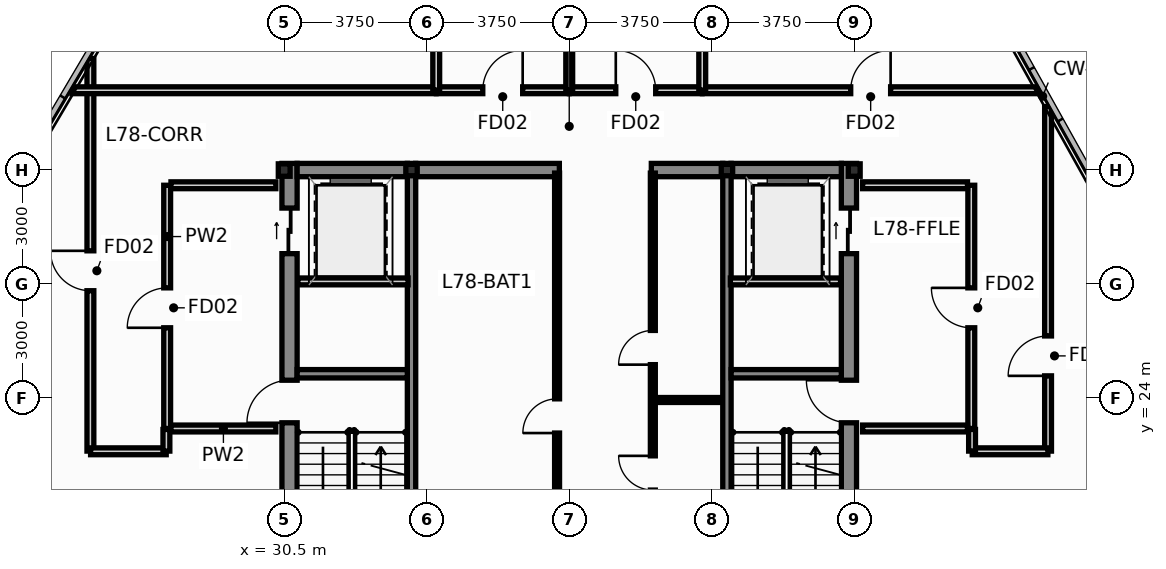
"""IFC4 building model, lengths in metres.
Left out: names, types, materials, properties, quantities, classifications, styles, units other than length and angle.
Written with IfcOpenShell. Run it as: python <this file> out.ifc"""

import sys

from ifc_helpers import new_model, si_unit, direction, frame, frame_2d, origin, origin_2d, place, context, subcontext, project, spatial, rectangle, hollow_rectangle, i_section, extrude, source, transform, mapped, element, fill, save


model = new_model("IFC4")
c1 = context("Model", 3, precision=1e-05, world=origin(), true_north=direction((0.0, 1.0)))
c2 = subcontext(c1, "Body", "Model", "MODEL_VIEW")
j1 = project(units=[si_unit("LENGTHUNIT", "METRE"), si_unit("PLANEANGLEUNIT", "RADIAN")], contexts=[c1])
p1 = place(None, origin())
s1 = spatial("IfcSite", under=j1, at=p1, CompositionType="ELEMENT")
p2 = place(p1, origin())
s2 = spatial("IfcBuilding", under=s1, at=p2, CompositionType="ELEMENT")
p3 = place(p2, frame((0.0, 0.0, 296.6)))
s3 = spatial("IfcBuildingStorey", under=s2, at=p3, CompositionType="ELEMENT", Elevation=296.6)
m1 = source(origin(), c2, "Body", "SweptSolid", [
    extrude(i_section(OverallWidth=0.311, OverallDepth=0.327, WebThickness=0.016, FlangeThickness=0.025, at=origin_2d()), origin(), (0.0, 0.0, 1.0), 3.4),
])
for number, where, z_axis, x_axis in (
    (1, (45.5, 30.0, 0.0), (0.0, 0.0, 1.0), (1.0, 0.0, 0.0)),
    (2, (30.5, 30.0, 0.0), (0.0, 0.0, 1.0), (1.0, 0.0, 0.0)),
):
    element("IfcColumn", number, at=place(p3, frame(where, z_axis=z_axis, x_axis=x_axis)), inside=s3, PredefinedType="COLUMN", context=c2, shape_type="MappedRepresentation", body=[
        mapped(m1, transform((0.0, 0.0, 0.0), scale=1.0)),
    ])
m2 = source(origin(), c2, "Body", "SweptSolid", [
    extrude(hollow_rectangle(XDim=0.3, YDim=0.3, WallThickness=0.012, at=origin_2d()), origin(), (0.0, 0.0, 1.0), 3.4),
])
for number, where, z_axis, x_axis in (
    (3, (33.85, 30.0, 0.0), (0.0, 0.0, 1.0), (1.0, 0.0, 0.0)),
    (4, (42.15, 30.0, 0.0), (0.0, 0.0, 1.0), (1.0, 0.0, 0.0)),
):
    element("IfcColumn", number, at=place(p3, frame(where, z_axis=z_axis, x_axis=x_axis)), inside=s3, PredefinedType="COLUMN", context=c2, shape_type="MappedRepresentation", body=[
        mapped(m2, transform((0.0, 0.0, 0.0), scale=1.0)),
    ])
p4 = place(p3, frame((30.64, 17.05, 0.0), z_axis=(0.0, 0.0, 1.0), x_axis=(0.0, 1.0, 0.0)))
e5 = element("IfcWall", 5, at=p4, inside=s3, PredefinedType="SHEAR", context=c2, shape_type="SweptSolid", body=[
    extrude(rectangle(XDim=13.125, YDim=0.4, at=frame_2d((6.562, 0.0))), origin(), (0.0, 0.0, 1.0), 3.4),
])
p5 = place(p4, frame((6.3, 0.0, 0.0)))
e6 = element("IfcOpeningElement", 6, at=p5, cuts=e5, PredefinedType="OPENING", context=c2, shape_type="SweptSolid", body=[
    extrude(rectangle(XDim=1.12, YDim=2.15, at=frame_2d((0.56, 1.075))), frame((0.0, 0.212, 0.0), z_axis=(0.0, -1.0, 0.0), x_axis=(1.0, 0.0, 0.0)), (0.0, 0.0, 1.0), 0.424),
])
p6 = place(p4, frame((10.75, 0.0, 0.0)))
e7 = element("IfcOpeningElement", 7, at=p6, cuts=e5, PredefinedType="OPENING", context=c2, shape_type="SweptSolid", body=[
    extrude(rectangle(XDim=1.2, YDim=2.2, at=frame_2d((0.6, 1.1))), frame((0.0, 0.212, 0.0), z_axis=(0.0, -1.0, 0.0), x_axis=(1.0, 0.0, 0.0)), (0.0, 0.0, 1.0), 0.424),
])
p7 = place(p3, frame((45.36, 17.05, 0.0), z_axis=(0.0, 0.0, 1.0), x_axis=(0.0, 1.0, 0.0)))
e8 = element("IfcWall", 8, at=p7, inside=s3, PredefinedType="SHEAR", context=c2, shape_type="SweptSolid", body=[
    extrude(rectangle(XDim=13.125, YDim=0.4, at=frame_2d((6.562, 0.0))), origin(), (0.0, 0.0, 1.0), 3.4),
])
p8 = place(p7, frame((6.3, 0.0, 0.0)))
e9 = element("IfcOpeningElement", 9, at=p8, cuts=e8, PredefinedType="OPENING", context=c2, shape_type="SweptSolid", body=[
    extrude(rectangle(XDim=1.12, YDim=2.15, at=frame_2d((0.56, 1.075))), frame((0.0, 0.212, 0.0), z_axis=(0.0, -1.0, 0.0), x_axis=(1.0, 0.0, 0.0)), (0.0, 0.0, 1.0), 0.424),
])
p9 = place(p7, frame((10.75, 0.0, 0.0)))
e10 = element("IfcOpeningElement", 10, at=p9, cuts=e8, PredefinedType="OPENING", context=c2, shape_type="SweptSolid", body=[
    extrude(rectangle(XDim=1.2, YDim=2.2, at=frame_2d((0.6, 1.1))), frame((0.0, 0.212, 0.0), z_axis=(0.0, -1.0, 0.0), x_axis=(1.0, 0.0, 0.0)), (0.0, 0.0, 1.0), 0.424),
])
p10 = place(p3, frame((30.84, 30.0, 0.0), z_axis=(0.0, 0.0, 1.0), x_axis=(1.0, 0.0, 0.0)))
e11 = element("IfcWall", 11, at=p10, inside=s3, PredefinedType="SHEAR", context=c2, shape_type="SweptSolid", body=[
    extrude(rectangle(XDim=2.9, YDim=0.35, at=frame_2d((1.45, 0.0))), origin(), (0.0, 0.0, 1.0), 3.4),
])
p11 = place(p3, frame((33.96, 30.0, 0.0), z_axis=(0.0, 0.0, 1.0), x_axis=(1.0, 0.0, 0.0)))
e12 = element("IfcWall", 12, at=p11, inside=s3, PredefinedType="SHEAR", context=c2, shape_type="SweptSolid", body=[
    extrude(rectangle(XDim=3.78, YDim=0.35, at=frame_2d((1.89, 0.0))), origin(), (0.0, 0.0, 1.0), 3.4),
])
p12 = place(p3, frame((40.16, 30.0, 0.0), z_axis=(0.0, 0.0, 1.0), x_axis=(1.0, 0.0, 0.0)))
e13 = element("IfcWall", 13, at=p12, inside=s3, PredefinedType="SHEAR", context=c2, shape_type="SweptSolid", body=[
    extrude(rectangle(XDim=1.88, YDim=0.35, at=frame_2d((0.94, 0.0))), origin(), (0.0, 0.0, 1.0), 3.4),
])
p13 = place(p3, frame((42.26, 30.0, 0.0), z_axis=(0.0, 0.0, 1.0), x_axis=(1.0, 0.0, 0.0)))
e14 = element("IfcWall", 14, at=p13, inside=s3, PredefinedType="SHEAR", context=c2, shape_type="SweptSolid", body=[
    extrude(rectangle(XDim=2.9, YDim=0.35, at=frame_2d((1.45, 0.0))), origin(), (0.0, 0.0, 1.0), 3.4),
])
for number, where, z_axis, x_axis in (
    (15, (33.85, 17.05, 0.0), (0.0, 0.0, 1.0), (0.0, 1.0, 0.0)),
    (16, (42.15, 17.05, 0.0), (0.0, 0.0, 1.0), (0.0, 1.0, 0.0)),
):
    element("IfcWall", number, at=place(p3, frame(where, z_axis=z_axis, x_axis=x_axis)), inside=s3, PredefinedType="SHEAR", context=c2, shape_type="SweptSolid", body=[
        extrude(rectangle(XDim=13.125, YDim=0.22, at=frame_2d((6.562, 0.0))), origin(), (0.0, 0.0, 1.0), 3.4),
    ])
for number, where, z_axis, x_axis in (
    (17, (30.84, 24.64, 0.0), (0.0, 0.0, 1.0), (1.0, 0.0, 0.0)),
    (18, (42.26, 24.64, 0.0), (0.0, 0.0, 1.0), (1.0, 0.0, 0.0)),
):
    element("IfcWall", number, at=place(p3, frame(where, z_axis=z_axis, x_axis=x_axis)), inside=s3, PredefinedType="SHEAR", context=c2, shape_type="SweptSolid", body=[
        extrude(rectangle(XDim=2.9, YDim=0.22, at=frame_2d((1.45, 0.0))), origin(), (0.0, 0.0, 1.0), 3.4),
    ])
p14 = place(p3, frame((27.42, 23.2, 0.0), z_axis=(0.0, 0.0, 1.0), x_axis=(0.0, 1.0, 0.0)))
e19 = element("IfcWall", 19, at=p14, inside=s3, PredefinedType="PARTITIONING", context=c2, shape_type="SweptSolid", body=[
    extrude(rectangle(XDim=6.4, YDim=0.18, at=frame_2d((3.2, 0.0))), origin(), (0.0, 0.0, 1.0), 2.879),
])
p15 = place(p14, frame((2.65, 0.0, 0.0)))
e20 = element("IfcOpeningElement", 20, at=p15, cuts=e19, PredefinedType="OPENING", context=c2, shape_type="SweptSolid", body=[
    extrude(rectangle(XDim=1.05, YDim=2.15, at=frame_2d((0.525, 1.075))), frame((0.0, 0.102, 0.0), z_axis=(0.0, -1.0, 0.0), x_axis=(1.0, 0.0, 0.0)), (0.0, 0.0, 1.0), 0.204),
])
for number, where, z_axis, x_axis in (
    (21, (27.52, 23.2, 0.0), (0.0, 0.0, 1.0), (1.0, 0.0, 0.0)),
    (22, (27.52, 29.6, 0.0), (0.0, 0.0, 1.0), (1.0, 0.0, 0.0)),
):
    element("IfcWall", number, at=place(p3, frame(where, z_axis=z_axis, x_axis=x_axis)), inside=s3, PredefinedType="PARTITIONING", context=c2, shape_type="SweptSolid", body=[
        extrude(rectangle(XDim=2.76, YDim=0.18, at=frame_2d((1.38, 0.0))), origin(), (0.0, 0.0, 1.0), 3.15),
    ])
p16 = place(p3, frame((48.58, 23.2, 0.0), z_axis=(0.0, 0.0, 1.0), x_axis=(0.0, 1.0, 0.0)))
e23 = element("IfcWall", 23, at=p16, inside=s3, PredefinedType="PARTITIONING", context=c2, shape_type="SweptSolid", body=[
    extrude(rectangle(XDim=6.4, YDim=0.18, at=frame_2d((3.2, 0.0))), origin(), (0.0, 0.0, 1.0), 2.879),
])
p17 = place(p16, frame((2.65, 0.0, 0.0)))
e24 = element("IfcOpeningElement", 24, at=p17, cuts=e23, PredefinedType="OPENING", context=c2, shape_type="SweptSolid", body=[
    extrude(rectangle(XDim=1.05, YDim=2.15, at=frame_2d((0.525, 1.075))), frame((0.0, 0.102, 0.0), z_axis=(0.0, -1.0, 0.0), x_axis=(1.0, 0.0, 0.0)), (0.0, 0.0, 1.0), 0.204),
])
for number, where, z_axis, x_axis in (
    (25, (45.72, 23.2, 0.0), (0.0, 0.0, 1.0), (1.0, 0.0, 0.0)),
    (26, (45.72, 29.6, 0.0), (0.0, 0.0, 1.0), (1.0, 0.0, 0.0)),
):
    element("IfcWall", number, at=place(p3, frame(where, z_axis=z_axis, x_axis=x_axis)), inside=s3, PredefinedType="PARTITIONING", context=c2, shape_type="SweptSolid", body=[
        extrude(rectangle(XDim=2.76, YDim=0.18, at=frame_2d((1.38, 0.0))), origin(), (0.0, 0.0, 1.0), 3.15),
    ])
for number, where, z_axis, x_axis in (
    (27, (30.86, 27.07, 0.0), (0.0, 0.0, 1.0), (1.0, 0.0, 0.0)),
    (28, (42.24, 27.07, 0.0), (0.0, 0.0, 1.0), (1.0, 0.0, 0.0)),
):
    element("IfcWall", number, at=place(p3, frame(where, z_axis=z_axis, x_axis=x_axis)), inside=s3, PredefinedType="PARTITIONING", context=c2, shape_type="SweptSolid", body=[
        extrude(rectangle(XDim=2.9, YDim=0.18, at=frame_2d((1.45, 0.0))), origin(), (0.0, 0.0, 1.0), 3.15),
    ])
p18 = place(p3, frame((40.28, 23.95, 0.0), z_axis=(0.0, 0.0, 1.0), x_axis=(1.0, 0.0, 0.0)))
e29 = element("IfcWall", 29, at=p18, inside=s3, PredefinedType="PARTITIONING", context=c2, shape_type="SweptSolid", body=[
    extrude(rectangle(XDim=1.7, YDim=0.13, at=frame_2d((0.85, 0.0))), origin(), (0.0, 0.0, 1.0), 3.15),
])
p19 = place(p3, frame((37.68, 20.48, 0.0), z_axis=(0.0, 0.0, 1.0), x_axis=(0.0, 1.0, 0.0)))
e30 = element("IfcWall", 30, at=p19, inside=s3, PredefinedType="PARTITIONING", context=c2, shape_type="SweptSolid", body=[
    extrude(rectangle(XDim=9.44, YDim=0.13, at=frame_2d((4.72, 0.0))), origin(), (0.0, 0.0, 1.0), 3.15),
])
p20 = place(p19, frame((2.6, 0.0, 0.0)))
e31 = element("IfcOpeningElement", 31, at=p20, cuts=e30, PredefinedType="OPENING", context=c2, shape_type="SweptSolid", body=[
    extrude(rectangle(XDim=0.9, YDim=2.1, at=frame_2d((0.45, 1.05))), frame((0.0, 0.077, 0.0), z_axis=(0.0, -1.0, 0.0), x_axis=(1.0, 0.0, 0.0)), (0.0, 0.0, 1.0), 0.154),
])
p21 = place(p3, frame((40.2, 20.48, 0.0), z_axis=(0.0, 0.0, 1.0), x_axis=(0.0, 1.0, 0.0)))
e32 = element("IfcWall", 32, at=p21, inside=s3, PredefinedType="PARTITIONING", context=c2, shape_type="SweptSolid", body=[
    extrude(rectangle(XDim=9.44, YDim=0.13, at=frame_2d((4.72, 0.0))), origin(), (0.0, 0.0, 1.0), 3.15),
])
p22 = place(p21, frame((1.1, 0.0, 0.0)))
e33 = element("IfcOpeningElement", 33, at=p22, cuts=e32, PredefinedType="OPENING", context=c2, shape_type="SweptSolid", body=[
    extrude(rectangle(XDim=0.9, YDim=2.1, at=frame_2d((0.45, 1.05))), frame((0.0, 0.077, 0.0), z_axis=(0.0, -1.0, 0.0), x_axis=(1.0, 0.0, 0.0)), (0.0, 0.0, 1.0), 0.154),
])
p23 = place(p21, frame((4.4, 0.0, 0.0)))
e34 = element("IfcOpeningElement", 34, at=p23, cuts=e32, PredefinedType="OPENING", context=c2, shape_type="SweptSolid", body=[
    extrude(rectangle(XDim=0.9, YDim=2.1, at=frame_2d((0.45, 1.05))), frame((0.0, 0.077, 0.0), z_axis=(0.0, -1.0, 0.0), x_axis=(1.0, 0.0, 0.0)), (0.0, 0.0, 1.0), 0.154),
])
p24 = place(p3, frame((25.4, 22.605, 0.0), z_axis=(0.0, 0.0, 1.0), x_axis=(0.0, 1.0, 0.0)))
e35 = element("IfcWall", 35, at=p24, inside=s3, PredefinedType="PARTITIONING", context=c2, shape_type="SweptSolid", body=[
    extrude(rectangle(XDim=10.331, YDim=0.18, at=frame_2d((5.166, 0.0))), origin(), (0.0, 0.0, 1.0), 2.879),
])
p25 = place(p24, frame((4.22, 0.0, 0.0)))
e36 = element("IfcOpeningElement", 36, at=p25, cuts=e35, PredefinedType="OPENING", context=c2, shape_type="SweptSolid", body=[
    extrude(rectangle(XDim=1.05, YDim=2.15, at=frame_2d((0.525, 1.075))), frame((0.0, 0.102, 0.0), z_axis=(0.0, -1.0, 0.0), x_axis=(1.0, 0.0, 0.0)), (0.0, 0.0, 1.0), 0.204),
])
p26 = place(p3, frame((24.914, 32.1, 0.0), z_axis=(0.0, 0.0, 1.0), x_axis=(1.0, 0.0, 0.0)))
e37 = element("IfcWall", 37, at=p26, inside=s3, PredefinedType="PARTITIONING", context=c2, shape_type="SweptSolid", body=[
    extrude(rectangle(XDim=9.581, YDim=0.18, at=frame_2d((4.791, 0.0))), origin(), (0.0, 0.0, 1.0), 3.15),
])
p27 = place(p3, frame((50.6, 22.605, 0.0), z_axis=(0.0, 0.0, 1.0), x_axis=(0.0, 1.0, 0.0)))
e38 = element("IfcWall", 38, at=p27, inside=s3, PredefinedType="PARTITIONING", context=c2, shape_type="SweptSolid", body=[
    extrude(rectangle(XDim=9.065, YDim=0.18, at=frame_2d((4.532, 0.0))), origin(), (0.0, 0.0, 1.0), 2.879),
])
p28 = place(p27, frame((1.98, 0.0, 0.0)))
e39 = element("IfcOpeningElement", 39, at=p28, cuts=e38, PredefinedType="OPENING", context=c2, shape_type="SweptSolid", body=[
    extrude(rectangle(XDim=1.05, YDim=2.15, at=frame_2d((0.525, 1.075))), frame((0.0, 0.102, 0.0), z_axis=(0.0, -1.0, 0.0), x_axis=(1.0, 0.0, 0.0)), (0.0, 0.0, 1.0), 0.204),
])
p29 = place(p3, frame((41.505, 32.1, 0.0), z_axis=(0.0, 0.0, 1.0), x_axis=(1.0, 0.0, 0.0)))
e40 = element("IfcWall", 40, at=p29, inside=s3, PredefinedType="PARTITIONING", context=c2, shape_type="SweptSolid", body=[
    extrude(rectangle(XDim=8.855, YDim=0.18, at=frame_2d((4.428, 0.0))), origin(), (0.0, 0.0, 1.0), 3.15),
])
p30 = place(p29, frame((3.902, 0.0, 0.0)))
e41 = element("IfcOpeningElement", 41, at=p30, cuts=e40, PredefinedType="OPENING", context=c2, shape_type="SweptSolid", body=[
    extrude(rectangle(XDim=1.05, YDim=2.15, at=frame_2d((0.525, 1.075))), frame((0.0, 0.102, 0.0), z_axis=(0.0, -1.0, 0.0), x_axis=(1.0, 0.0, 0.0)), (0.0, 0.0, 1.0), 0.204),
])
p31 = place(p3, frame((34.505, 32.1, 0.0), z_axis=(0.0, 0.0, 1.0), x_axis=(1.0, 0.0, 0.0)))
e42 = element("IfcWall", 42, at=p31, inside=s3, PredefinedType="PARTITIONING", context=c2, shape_type="SweptSolid", body=[
    extrude(rectangle(XDim=3.49, YDim=0.18, at=frame_2d((1.745, 0.0))), origin(), (0.0, 0.0, 1.0), 3.15),
])
p32 = place(p31, frame((1.22, 0.0, 0.0)))
e43 = element("IfcOpeningElement", 43, at=p32, cuts=e42, PredefinedType="OPENING", context=c2, shape_type="SweptSolid", body=[
    extrude(rectangle(XDim=1.05, YDim=2.15, at=frame_2d((0.525, 1.075))), frame((0.0, 0.102, 0.0), z_axis=(0.0, -1.0, 0.0), x_axis=(1.0, 0.0, 0.0)), (0.0, 0.0, 1.0), 0.204),
])
p33 = place(p3, frame((38.005, 32.1, 0.0), z_axis=(0.0, 0.0, 1.0), x_axis=(1.0, 0.0, 0.0)))
e44 = element("IfcWall", 44, at=p33, inside=s3, PredefinedType="PARTITIONING", context=c2, shape_type="SweptSolid", body=[
    extrude(rectangle(XDim=3.49, YDim=0.18, at=frame_2d((1.745, 0.0))), origin(), (0.0, 0.0, 1.0), 3.15),
])
p34 = place(p33, frame((1.22, 0.0, 0.0)))
e45 = element("IfcOpeningElement", 45, at=p34, cuts=e44, PredefinedType="OPENING", context=c2, shape_type="SweptSolid", body=[
    extrude(rectangle(XDim=1.05, YDim=2.15, at=frame_2d((0.525, 1.075))), frame((0.0, 0.102, 0.0), z_axis=(0.0, -1.0, 0.0), x_axis=(1.0, 0.0, 0.0)), (0.0, 0.0, 1.0), 0.204),
])
for number, where, z_axis, x_axis in (
    (46, (34.5, 32.105, 0.0), (0.0, 0.0, 1.0), (0.0, 1.0, 0.0)),
    (47, (38.0, 32.105, 0.0), (0.0, 0.0, 1.0), (0.0, 1.0, 0.0)),
    (48, (41.5, 32.105, 0.0), (0.0, 0.0, 1.0), (0.0, 1.0, 0.0)),
):
    element("IfcWall", number, at=place(p3, frame(where, z_axis=z_axis, x_axis=x_axis)), inside=s3, PredefinedType="PARTITIONING", context=c2, shape_type="SweptSolid", body=[
        extrude(rectangle(XDim=3.39, YDim=0.18, at=frame_2d((1.695, 0.0))), origin(), (0.0, 0.0, 1.0), 3.15),
    ])
for number, where, z_axis, x_axis in (
    (49, (27.395, 22.6, 0.0), (0.0, 0.0, 1.0), (-1.0, 0.0, 0.0)),
    (50, (48.605, 22.6, 0.0), (0.0, 0.0, 1.0), (1.0, 0.0, 0.0)),
):
    element("IfcWall", number, at=place(p3, frame(where, z_axis=z_axis, x_axis=x_axis)), inside=s3, PredefinedType="PARTITIONING", context=c2, shape_type="SweptSolid", body=[
        extrude(rectangle(XDim=1.99, YDim=0.18, at=frame_2d((0.995, 0.0))), origin(), (0.0, 0.0, 1.0), 3.15),
    ])
for number, where, z_axis, x_axis in (
    (51, (27.4, 23.175, 0.0), (0.0, 0.0, 1.0), (0.0, -1.0, 0.0)),
    (52, (48.6, 23.175, 0.0), (0.0, 0.0, 1.0), (0.0, -1.0, 0.0)),
):
    element("IfcWall", number, at=place(p3, frame(where, z_axis=z_axis, x_axis=x_axis)), inside=s3, PredefinedType="PARTITIONING", context=c2, shape_type="SweptSolid", body=[
        extrude(rectangle(XDim=0.57, YDim=0.18, at=frame_2d((0.285, 0.0))), origin(), (0.0, 0.0, 1.0), 2.879),
    ])
p35 = place(p5, origin())
e53 = element("IfcDoor", 53, at=p35, inside=s3, OperationType="SINGLE_SWING_LEFT", PredefinedType="DOOR", context=c2, shape_type="SweptSolid", body=[
    extrude(rectangle(XDim=1.12, YDim=2.15, at=frame_2d((0.56, 1.075))), frame((0.0, 0.025, 0.0), z_axis=(0.0, -1.0, 0.0), x_axis=(1.0, 0.0, 0.0)), (0.0, 0.0, 1.0), 0.05),
])
fill(e6, e53)
p36 = place(p6, origin())
e54 = element("IfcDoor", 54, at=p36, inside=s3, OperationType="SLIDING_TO_LEFT", PredefinedType="DOOR", context=c2, shape_type="SweptSolid", body=[
    extrude(rectangle(XDim=1.2, YDim=2.2, at=frame_2d((0.6, 1.1))), frame((0.0, 0.025, 0.0), z_axis=(0.0, -1.0, 0.0), x_axis=(1.0, 0.0, 0.0)), (0.0, 0.0, 1.0), 0.05),
])
fill(e7, e54)
p37 = place(p8, origin())
e55 = element("IfcDoor", 55, at=p37, inside=s3, OperationType="SINGLE_SWING_RIGHT", PredefinedType="DOOR", context=c2, shape_type="SweptSolid", body=[
    extrude(rectangle(XDim=1.12, YDim=2.15, at=frame_2d((0.56, 1.075))), frame((0.0, 0.025, 0.0), z_axis=(0.0, -1.0, 0.0), x_axis=(1.0, 0.0, 0.0)), (0.0, 0.0, 1.0), 0.05),
])
fill(e9, e55)
p38 = place(p9, origin())
e56 = element("IfcDoor", 56, at=p38, inside=s3, OperationType="SLIDING_TO_RIGHT", PredefinedType="DOOR", context=c2, shape_type="SweptSolid", body=[
    extrude(rectangle(XDim=1.2, YDim=2.2, at=frame_2d((0.6, 1.1))), frame((0.0, 0.025, 0.0), z_axis=(0.0, -1.0, 0.0), x_axis=(1.0, 0.0, 0.0)), (0.0, 0.0, 1.0), 0.05),
])
fill(e10, e56)
p39 = place(p15, origin())
e57 = element("IfcDoor", 57, at=p39, inside=s3, OperationType="SINGLE_SWING_LEFT", PredefinedType="DOOR", context=c2, shape_type="SweptSolid", body=[
    extrude(rectangle(XDim=1.05, YDim=2.15, at=frame_2d((0.525, 1.075))), frame((0.0, 0.025, 0.0), z_axis=(0.0, -1.0, 0.0), x_axis=(1.0, 0.0, 0.0)), (0.0, 0.0, 1.0), 0.05),
])
fill(e20, e57)
p40 = place(p17, origin())
e58 = element("IfcDoor", 58, at=p40, inside=s3, OperationType="SINGLE_SWING_RIGHT", PredefinedType="DOOR", context=c2, shape_type="SweptSolid", body=[
    extrude(rectangle(XDim=1.05, YDim=2.15, at=frame_2d((0.525, 1.075))), frame((0.0, 0.025, 0.0), z_axis=(0.0, -1.0, 0.0), x_axis=(1.0, 0.0, 0.0)), (0.0, 0.0, 1.0), 0.05),
])
fill(e24, e58)
p41 = place(p20, origin())
e59 = element("IfcDoor", 59, at=p41, inside=s3, OperationType="SINGLE_SWING_LEFT", PredefinedType="DOOR", context=c2, shape_type="SweptSolid", body=[
    extrude(rectangle(XDim=0.9, YDim=2.1, at=frame_2d((0.45, 1.05))), frame((0.0, 0.025, 0.0), z_axis=(0.0, -1.0, 0.0), x_axis=(1.0, 0.0, 0.0)), (0.0, 0.0, 1.0), 0.05),
])
fill(e31, e59)
p42 = place(p22, origin())
e60 = element("IfcDoor", 60, at=p42, inside=s3, OperationType="SINGLE_SWING_RIGHT", PredefinedType="DOOR", context=c2, shape_type="SweptSolid", body=[
    extrude(rectangle(XDim=0.9, YDim=2.1, at=frame_2d((0.45, 1.05))), frame((0.0, 0.025, 0.0), z_axis=(0.0, -1.0, 0.0), x_axis=(1.0, 0.0, 0.0)), (0.0, 0.0, 1.0), 0.05),
])
fill(e33, e60)
p43 = place(p23, origin())
e61 = element("IfcDoor", 61, at=p43, inside=s3, OperationType="SINGLE_SWING_LEFT", PredefinedType="DOOR", context=c2, shape_type="SweptSolid", body=[
    extrude(rectangle(XDim=0.9, YDim=2.1, at=frame_2d((0.45, 1.05))), frame((0.0, 0.025, 0.0), z_axis=(0.0, -1.0, 0.0), x_axis=(1.0, 0.0, 0.0)), (0.0, 0.0, 1.0), 0.05),
])
fill(e34, e61)
p44 = place(p25, origin())
e62 = element("IfcDoor", 62, at=p44, inside=s3, OperationType="SINGLE_SWING_RIGHT", PredefinedType="DOOR", context=c2, shape_type="SweptSolid", body=[
    extrude(rectangle(XDim=1.05, YDim=2.15, at=frame_2d((0.525, 1.075))), frame((0.0, 0.025, 0.0), z_axis=(0.0, -1.0, 0.0), x_axis=(1.0, 0.0, 0.0)), (0.0, 0.0, 1.0), 0.05),
])
fill(e36, e62)
p45 = place(p28, origin())
e63 = element("IfcDoor", 63, at=p45, inside=s3, OperationType="SINGLE_SWING_LEFT", PredefinedType="DOOR", context=c2, shape_type="SweptSolid", body=[
    extrude(rectangle(XDim=1.05, YDim=2.15, at=frame_2d((0.525, 1.075))), frame((0.0, 0.025, 0.0), z_axis=(0.0, -1.0, 0.0), x_axis=(1.0, 0.0, 0.0)), (0.0, 0.0, 1.0), 0.05),
])
fill(e39, e63)
p46 = place(p30, origin())
e64 = element("IfcDoor", 64, at=p46, inside=s3, OperationType="SINGLE_SWING_RIGHT", PredefinedType="DOOR", context=c2, shape_type="SweptSolid", body=[
    extrude(rectangle(XDim=1.05, YDim=2.15, at=frame_2d((0.525, 1.075))), frame((0.0, 0.025, 0.0), z_axis=(0.0, -1.0, 0.0), x_axis=(1.0, 0.0, 0.0)), (0.0, 0.0, 1.0), 0.05),
])
fill(e41, e64)
p47 = place(p32, origin())
e65 = element("IfcDoor", 65, at=p47, inside=s3, OperationType="SINGLE_SWING_RIGHT", PredefinedType="DOOR", context=c2, shape_type="SweptSolid", body=[
    extrude(rectangle(XDim=1.05, YDim=2.15, at=frame_2d((0.525, 1.075))), frame((0.0, 0.025, 0.0), z_axis=(0.0, -1.0, 0.0), x_axis=(1.0, 0.0, 0.0)), (0.0, 0.0, 1.0), 0.05),
])
fill(e43, e65)
p48 = place(p34, origin())
e66 = element("IfcDoor", 66, at=p48, inside=s3, OperationType="SINGLE_SWING_LEFT", PredefinedType="DOOR", context=c2, shape_type="SweptSolid", body=[
    extrude(rectangle(XDim=1.05, YDim=2.15, at=frame_2d((0.525, 1.075))), frame((0.0, 0.025, 0.0), z_axis=(0.0, -1.0, 0.0), x_axis=(1.0, 0.0, 0.0)), (0.0, 0.0, 1.0), 0.05),
])
fill(e45, e66)
save(model, sys.argv[1])
